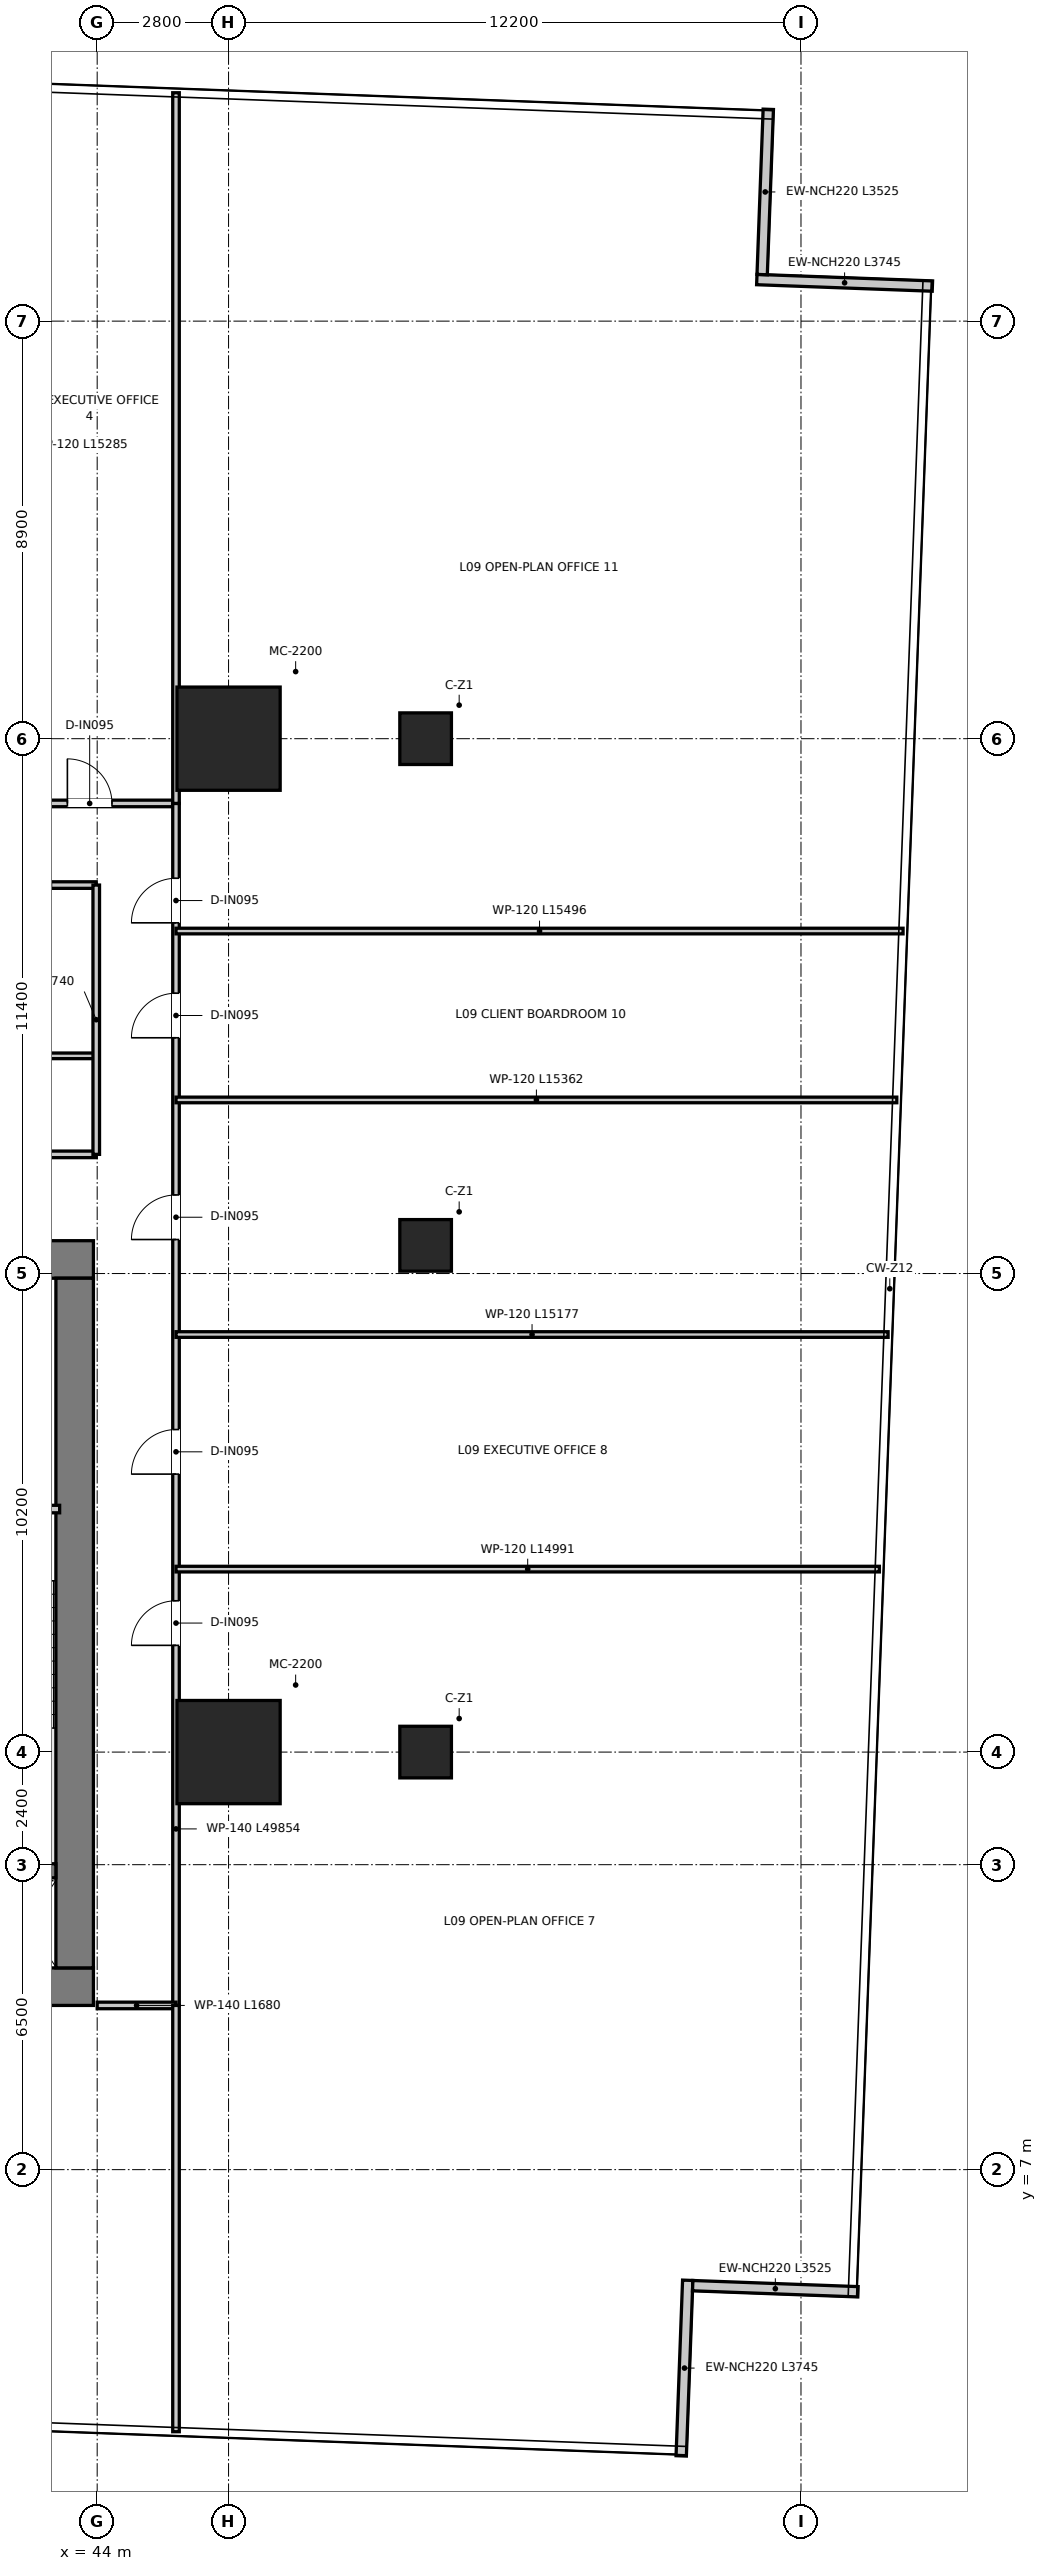
"""IFC4 building model, lengths in metres.
Left out: names, types, materials, properties, quantities, classifications, styles, units other than length and angle.
Written with IfcOpenShell. Run it as: python <this file> out.ifc"""

import sys

from ifc_helpers import new_model, si_unit, direction, frame, frame_2d, origin, origin_2d, place, context, subcontext, project, spatial, rectangle, extrude, source, transform, mapped, element, fill, save


model = new_model("IFC4")
c1 = context("Model", 3, precision=1e-05, world=origin(), true_north=direction((0.0, 1.0)))
c2 = subcontext(c1, "Body", "Model", "MODEL_VIEW")
j1 = project(units=[si_unit("LENGTHUNIT", "METRE"), si_unit("PLANEANGLEUNIT", "RADIAN")], contexts=[c1])
p1 = place(None, origin())
s1 = spatial("IfcSite", under=j1, at=p1, CompositionType="ELEMENT")
p2 = place(p1, origin())
s2 = spatial("IfcBuilding", under=s1, at=p2, CompositionType="ELEMENT")
p3 = place(p2, frame((0.0, 0.0, 40.8)))
s3 = spatial("IfcBuildingStorey", under=s2, at=p3, CompositionType="ELEMENT", Elevation=40.8)
p4 = place(p3, frame((28.08, 10.9, 0.0), z_axis=(0.0, 0.0, 1.0), x_axis=(1.0, 0.0, 0.0)))
e1 = element("IfcWall", 1, at=p4, inside=s3, PredefinedType="SHEAR", context=c2, shape_type="SweptSolid", body=[
    extrude(rectangle(XDim=15.84, YDim=0.8, at=frame_2d((7.92, 0.0))), origin(), (0.0, 0.0, 1.0), 3.95),
])
p5 = place(p3, frame((28.08, 26.4, 0.0), z_axis=(0.0, 0.0, 1.0), x_axis=(1.0, 0.0, 0.0)))
e2 = element("IfcWall", 2, at=p5, inside=s3, PredefinedType="SHEAR", context=c2, shape_type="SweptSolid", body=[
    extrude(rectangle(XDim=15.84, YDim=0.8, at=frame_2d((7.92, 0.0))), origin(), (0.0, 0.0, 1.0), 3.95),
])
p6 = place(p5, frame((7.22, 0.0, 0.0)))
e3 = element("IfcOpeningElement", 3, at=p6, cuts=e2, PredefinedType="OPENING", context=c2, shape_type="SweptSolid", body=[
    extrude(rectangle(XDim=1.4, YDim=2.2, at=frame_2d((0.7, 1.1))), frame((0.0, 0.41, 0.0), z_axis=(0.0, -1.0, 0.0), x_axis=(1.0, 0.0, 0.0)), (0.0, 0.0, 1.0), 0.82),
])
p7 = place(p5, frame((1.775, 0.0, 0.0)))
e4 = element("IfcOpeningElement", 4, at=p7, cuts=e2, PredefinedType="OPENING", context=c2, shape_type="SweptSolid", body=[
    extrude(rectangle(XDim=1.05, YDim=2.1, at=frame_2d((0.525, 1.05))), frame((0.0, 0.41, 0.0), z_axis=(0.0, -1.0, 0.0), x_axis=(1.0, 0.0, 0.0)), (0.0, 0.0, 1.0), 0.82),
])
p8 = place(p5, frame((13.015, 0.0, 0.0)))
e5 = element("IfcOpeningElement", 5, at=p8, cuts=e2, PredefinedType="OPENING", context=c2, shape_type="SweptSolid", body=[
    extrude(rectangle(XDim=1.05, YDim=2.1, at=frame_2d((0.525, 1.05))), frame((0.0, 0.41, 0.0), z_axis=(0.0, -1.0, 0.0), x_axis=(1.0, 0.0, 0.0)), (0.0, 0.0, 1.0), 0.82),
])
p9 = place(p3, frame((43.52, 11.3, 0.0), z_axis=(0.0, 0.0, 1.0), x_axis=(0.0, 1.0, 0.0)))
e6 = element("IfcWall", 6, at=p9, inside=s3, PredefinedType="SHEAR", context=c2, shape_type="SweptSolid", body=[
    extrude(rectangle(XDim=14.7, YDim=0.8, at=frame_2d((7.35, 0.0))), origin(), (0.0, 0.0, 1.0), 3.95),
])
p10 = place(p3, frame((40.02, 13.37, 0.0), z_axis=(0.0, 0.0, 1.0), x_axis=(1.0, 0.0, 0.0)))
e7 = element("IfcWall", 7, at=p10, inside=s3, PredefinedType="SHEAR", context=c2, shape_type="SweptSolid", body=[
    extrude(rectangle(XDim=3.1, YDim=0.3, at=frame_2d((1.55, 0.0))), origin(), (0.0, 0.0, 1.0), 3.95),
])
m1 = source(origin(), c2, "Body", "SweptSolid", [
    extrude(rectangle(XDim=2.2, YDim=2.2, at=origin_2d()), origin(), (0.0, 0.0, 1.0), 3.95),
])
for number, where, z_axis, x_axis in (
    (8, (46.8, 15.9, 0.0), (0.0, 0.0, 1.0), (1.0, 0.0, 0.0)),
    (9, (46.8, 37.5, 0.0), (0.0, 0.0, 1.0), (1.0, 0.0, 0.0)),
):
    element("IfcColumn", number, at=place(p3, frame(where, z_axis=z_axis, x_axis=x_axis)), inside=s3, PredefinedType="USERDEFINED", context=c2, shape_type="MappedRepresentation", body=[
        mapped(m1, transform((0.0, 0.0, 0.0), x_axis=(1.0, 0.0, 0.0), y_axis=(0.0, 1.0, 0.0), z_axis=(0.0, 0.0, 1.0), scale=1.0)),
    ])
m2 = source(origin(), c2, "Body", "SweptSolid", [
    extrude(rectangle(XDim=1.1, YDim=1.1, at=origin_2d()), origin(), (0.0, 0.0, 1.0), 3.95),
])
for number, where, z_axis, x_axis in (
    (10, (51.0, 37.5, 0.0), (0.0, 0.0, 1.0), (1.0, 0.0, 0.0)),
    (11, (51.0, 26.7, 0.0), (0.0, 0.0, 1.0), (1.0, 0.0, 0.0)),
    (12, (51.0, 15.9, 0.0), (0.0, 0.0, 1.0), (1.0, 0.0, 0.0)),
):
    element("IfcColumn", number, at=place(p3, frame(where, z_axis=z_axis, x_axis=x_axis)), inside=s3, PredefinedType="COLUMN", context=c2, shape_type="MappedRepresentation", body=[
        mapped(m2, transform((0.0, 0.0, 0.0), x_axis=(1.0, 0.0, 0.0), y_axis=(0.0, 1.0, 0.0), z_axis=(0.0, 0.0, 1.0), scale=1.0)),
    ])
p11 = place(p3, frame((56.447, 0.899, 0.0), z_axis=(0.0, 0.0, 1.0), x_axis=(0.037093640215, 0.999311794114, 0.0)))
e13 = element("IfcWall", 13, at=p11, inside=s3, PredefinedType="ELEMENTEDWALL", context=c2, shape_type="SweptSolid", body=[
    extrude(rectangle(XDim=3.745, YDim=0.22, at=frame_2d((1.873, 0.0))), origin(), (0.0, 0.0, 1.0), 3.67),
])
p12 = place(p3, frame((56.692, 4.528, 0.0), z_axis=(0.0, 0.0, 1.0), x_axis=(0.99931065272, -0.037124376896, 0.0)))
e14 = element("IfcWall", 14, at=p12, inside=s3, PredefinedType="ELEMENTEDWALL", context=c2, shape_type="SweptSolid", body=[
    extrude(rectangle(XDim=3.525, YDim=0.22, at=frame_2d((1.762, 0.0))), origin(), (0.0, 0.0, 1.0), 3.67),
])
p13 = place(p3, frame((61.801, 47.147, 0.0), z_axis=(0.0, 0.0, 1.0), x_axis=(-0.999314208504, 0.037028538746, 0.0)))
e15 = element("IfcWall", 15, at=p13, inside=s3, PredefinedType="ELEMENTEDWALL", context=c2, shape_type="SweptSolid", body=[
    extrude(rectangle(XDim=3.745, YDim=0.22, at=frame_2d((1.873, 0.0))), origin(), (0.0, 0.0, 1.0), 3.67),
])
p14 = place(p3, frame((58.173, 47.392, 0.0), z_axis=(0.0, 0.0, 1.0), x_axis=(0.03705521019, 0.999313219865, 0.0)))
e16 = element("IfcWall", 16, at=p14, inside=s3, PredefinedType="ELEMENTEDWALL", context=c2, shape_type="SweptSolid", body=[
    extrude(rectangle(XDim=3.525, YDim=0.22, at=frame_2d((1.762, 0.0))), origin(), (0.0, 0.0, 1.0), 3.67),
])
p15 = place(p3, frame((40.04, 21.08, 0.0), z_axis=(0.0, 0.0, 1.0), x_axis=(1.0, 0.0, 0.0)))
e17 = element("IfcWall", 17, at=p15, inside=s3, PredefinedType="PARTITIONING", context=c2, shape_type="SweptSolid", body=[
    extrude(rectangle(XDim=3.16, YDim=0.16, at=frame_2d((1.58, 0.0))), origin(), (0.0, 0.0, 1.0), 3.67),
])
p16 = place(p15, frame((1.055, 0.0, 0.0)))
e18 = element("IfcOpeningElement", 18, at=p16, cuts=e17, PredefinedType="OPENING", context=c2, shape_type="SweptSolid", body=[
    extrude(rectangle(XDim=1.05, YDim=2.1, at=frame_2d((0.525, 1.05))), frame((0.0, 0.09, 0.0), z_axis=(0.0, -1.0, 0.0), x_axis=(1.0, 0.0, 0.0)), (0.0, 0.0, 1.0), 0.18),
])
p17 = place(p3, frame((28.02, 28.64, 0.0), z_axis=(0.0, 0.0, 1.0), x_axis=(1.0, 0.0, 0.0)))
e19 = element("IfcWall", 19, at=p17, inside=s3, PredefinedType="PARTITIONING", context=c2, shape_type="SweptSolid", body=[
    extrude(rectangle(XDim=15.96, YDim=0.14, at=frame_2d((7.98, 0.0))), origin(), (0.0, 0.0, 1.0), 3.08),
])
p18 = place(p17, frame((7.455, 0.0, 0.0)))
e20 = element("IfcOpeningElement", 20, at=p18, cuts=e19, PredefinedType="OPENING", context=c2, shape_type="SweptSolid", body=[
    extrude(rectangle(XDim=1.05, YDim=2.15, at=frame_2d((0.525, 1.075))), frame((0.0, 0.08, 0.0), z_axis=(0.0, -1.0, 0.0), x_axis=(1.0, 0.0, 0.0)), (0.0, 0.0, 1.0), 0.16),
])
p19 = place(p3, frame((28.02, 30.74, 0.0), z_axis=(0.0, 0.0, 1.0), x_axis=(1.0, 0.0, 0.0)))
e21 = element("IfcWall", 21, at=p19, inside=s3, PredefinedType="PARTITIONING", context=c2, shape_type="SweptSolid", body=[
    extrude(rectangle(XDim=15.96, YDim=0.12, at=frame_2d((7.98, 0.0))), origin(), (0.0, 0.0, 1.0), 3.08),
])
p20 = place(p3, frame((28.02, 34.38, 0.0), z_axis=(0.0, 0.0, 1.0), x_axis=(1.0, 0.0, 0.0)))
e22 = element("IfcWall", 22, at=p20, inside=s3, PredefinedType="PARTITIONING", context=c2, shape_type="SweptSolid", body=[
    extrude(rectangle(XDim=15.96, YDim=0.14, at=frame_2d((7.98, 0.0))), origin(), (0.0, 0.0, 1.0), 3.08),
])
p21 = place(p20, frame((7.83, 0.0, 0.0)))
e23 = element("IfcOpeningElement", 23, at=p21, cuts=e22, PredefinedType="OPENING", context=c2, shape_type="SweptSolid", body=[
    extrude(rectangle(XDim=0.9, YDim=2.1, at=frame_2d((0.45, 1.05))), frame((0.0, 0.08, 0.0), z_axis=(0.0, -1.0, 0.0), x_axis=(1.0, 0.0, 0.0)), (0.0, 0.0, 1.0), 0.16),
])
p22 = place(p20, frame((11.03, 0.0, 0.0)))
e24 = element("IfcOpeningElement", 24, at=p22, cuts=e22, PredefinedType="OPENING", context=c2, shape_type="SweptSolid", body=[
    extrude(rectangle(XDim=0.9, YDim=2.1, at=frame_2d((0.45, 1.05))), frame((0.0, 0.08, 0.0), z_axis=(0.0, -1.0, 0.0), x_axis=(1.0, 0.0, 0.0)), (0.0, 0.0, 1.0), 0.16),
])
p23 = place(p20, frame((14.055, 0.0, 0.0)))
e25 = element("IfcOpeningElement", 25, at=p23, cuts=e22, PredefinedType="OPENING", context=c2, shape_type="SweptSolid", body=[
    extrude(rectangle(XDim=0.95, YDim=2.1, at=frame_2d((0.475, 1.05))), frame((0.0, 0.08, 0.0), z_axis=(0.0, -1.0, 0.0), x_axis=(1.0, 0.0, 0.0)), (0.0, 0.0, 1.0), 0.16),
])
p24 = place(p20, frame((2.855, 0.0, 0.0)))
e26 = element("IfcOpeningElement", 26, at=p24, cuts=e22, PredefinedType="OPENING", context=c2, shape_type="SweptSolid", body=[
    extrude(rectangle(XDim=0.95, YDim=2.1, at=frame_2d((0.475, 1.05))), frame((0.0, 0.08, 0.0), z_axis=(0.0, -1.0, 0.0), x_axis=(1.0, 0.0, 0.0)), (0.0, 0.0, 1.0), 0.16),
])
p25 = place(p3, frame((43.98, 28.64, 0.0), z_axis=(0.0, 0.0, 1.0), x_axis=(0.0, 1.0, 0.0)))
e27 = element("IfcWall", 27, at=p25, inside=s3, PredefinedType="PARTITIONING", context=c2, shape_type="SweptSolid", body=[
    extrude(rectangle(XDim=5.74, YDim=0.14, at=frame_2d((2.87, 0.0))), origin(), (0.0, 0.0, 1.0), 3.22),
])
p26 = place(p3, frame((26.32, 36.12, 0.0), z_axis=(0.0, 0.0, 1.0), x_axis=(1.0, 0.0, 0.0)))
e28 = element("IfcWall", 28, at=p26, inside=s3, PredefinedType="PARTITIONING", context=c2, shape_type="SweptSolid", body=[
    extrude(rectangle(XDim=19.36, YDim=0.14, at=frame_2d((9.68, 0.0))), origin(), (0.0, 0.0, 1.0), 3.08),
])
p27 = place(p26, frame((1.365, 0.0, 0.0)))
e29 = element("IfcOpeningElement", 29, at=p27, cuts=e28, PredefinedType="OPENING", context=c2, shape_type="SweptSolid", body=[
    extrude(rectangle(XDim=0.95, YDim=2.1, at=frame_2d((0.475, 1.05))), frame((0.0, 0.08, 0.0), z_axis=(0.0, -1.0, 0.0), x_axis=(1.0, 0.0, 0.0)), (0.0, 0.0, 1.0), 0.16),
])
p28 = place(p26, frame((6.205, 0.0, 0.0)))
e30 = element("IfcOpeningElement", 30, at=p28, cuts=e28, PredefinedType="OPENING", context=c2, shape_type="SweptSolid", body=[
    extrude(rectangle(XDim=0.95, YDim=2.1, at=frame_2d((0.475, 1.05))), frame((0.0, 0.08, 0.0), z_axis=(0.0, -1.0, 0.0), x_axis=(1.0, 0.0, 0.0)), (0.0, 0.0, 1.0), 0.16),
])
p29 = place(p26, frame((12.205, 0.0, 0.0)))
e31 = element("IfcOpeningElement", 31, at=p29, cuts=e28, PredefinedType="OPENING", context=c2, shape_type="SweptSolid", body=[
    extrude(rectangle(XDim=0.95, YDim=2.1, at=frame_2d((0.475, 1.05))), frame((0.0, 0.08, 0.0), z_axis=(0.0, -1.0, 0.0), x_axis=(1.0, 0.0, 0.0)), (0.0, 0.0, 1.0), 0.16),
])
p30 = place(p26, frame((17.045, 0.0, 0.0)))
e32 = element("IfcOpeningElement", 32, at=p30, cuts=e28, PredefinedType="OPENING", context=c2, shape_type="SweptSolid", body=[
    extrude(rectangle(XDim=0.95, YDim=2.1, at=frame_2d((0.475, 1.05))), frame((0.0, 0.08, 0.0), z_axis=(0.0, -1.0, 0.0), x_axis=(1.0, 0.0, 0.0)), (0.0, 0.0, 1.0), 0.16),
])
p31 = place(p3, frame((45.68, 10.5, 0.0), z_axis=(0.0, 0.0, 1.0), x_axis=(0.0, 1.0, 0.0)))
e33 = element("IfcWall", 33, at=p31, inside=s3, PredefinedType="PARTITIONING", context=c2, shape_type="SweptSolid", body=[
    extrude(rectangle(XDim=25.62, YDim=0.14, at=frame_2d((12.81, 0.0))), origin(), (0.0, 0.0, 1.0), 2.97),
])
p32 = place(p31, frame((7.675, 0.0, 0.0)))
e34 = element("IfcOpeningElement", 34, at=p32, cuts=e33, PredefinedType="OPENING", context=c2, shape_type="SweptSolid", body=[
    extrude(rectangle(XDim=0.95, YDim=2.1, at=frame_2d((0.475, 1.05))), frame((0.0, 0.08, 0.0), z_axis=(0.0, -1.0, 0.0), x_axis=(1.0, 0.0, 0.0)), (0.0, 0.0, 1.0), 0.16),
])
p33 = place(p31, frame((11.325, 0.0, 0.0)))
e35 = element("IfcOpeningElement", 35, at=p33, cuts=e33, PredefinedType="OPENING", context=c2, shape_type="SweptSolid", body=[
    extrude(rectangle(XDim=0.95, YDim=2.1, at=frame_2d((0.475, 1.05))), frame((0.0, 0.08, 0.0), z_axis=(0.0, -1.0, 0.0), x_axis=(1.0, 0.0, 0.0)), (0.0, 0.0, 1.0), 0.16),
])
p34 = place(p31, frame((16.325, 0.0, 0.0)))
e36 = element("IfcOpeningElement", 36, at=p34, cuts=e33, PredefinedType="OPENING", context=c2, shape_type="SweptSolid", body=[
    extrude(rectangle(XDim=0.95, YDim=2.1, at=frame_2d((0.475, 1.05))), frame((0.0, 0.08, 0.0), z_axis=(0.0, -1.0, 0.0), x_axis=(1.0, 0.0, 0.0)), (0.0, 0.0, 1.0), 0.16),
])
p35 = place(p31, frame((20.625, 0.0, 0.0)))
e37 = element("IfcOpeningElement", 37, at=p35, cuts=e33, PredefinedType="OPENING", context=c2, shape_type="SweptSolid", body=[
    extrude(rectangle(XDim=0.95, YDim=2.1, at=frame_2d((0.475, 1.05))), frame((0.0, 0.08, 0.0), z_axis=(0.0, -1.0, 0.0), x_axis=(1.0, 0.0, 0.0)), (0.0, 0.0, 1.0), 0.16),
])
p36 = place(p31, frame((23.075, 0.0, 0.0)))
e38 = element("IfcOpeningElement", 38, at=p36, cuts=e33, PredefinedType="OPENING", context=c2, shape_type="SweptSolid", body=[
    extrude(rectangle(XDim=0.95, YDim=2.1, at=frame_2d((0.475, 1.05))), frame((0.0, 0.08, 0.0), z_axis=(0.0, -1.0, 0.0), x_axis=(1.0, 0.0, 0.0)), (0.0, 0.0, 1.0), 0.16),
])
p37 = place(p3, frame((44.0, 10.5, 0.0), z_axis=(0.0, 0.0, 1.0), x_axis=(1.0, 0.0, 0.0)))
e39 = element("IfcWall", 39, at=p37, inside=s3, PredefinedType="PARTITIONING", context=c2, shape_type="SweptSolid", body=[
    extrude(rectangle(XDim=1.68, YDim=0.14, at=frame_2d((0.84, 0.0))), origin(), (0.0, 0.0, 1.0), 3.67),
])
p38 = place(p3, frame((45.68, 36.12, 0.0), z_axis=(0.0, 0.0, 1.0), x_axis=(0.0, 1.0, 0.0)))
e40 = element("IfcWall", 40, at=p38, inside=s3, PredefinedType="PARTITIONING", context=c2, shape_type="SweptSolid", body=[
    extrude(rectangle(XDim=15.148, YDim=0.14, at=frame_2d((7.574, 0.0))), origin(), (0.0, 0.0, 1.0), 2.97),
])
p39 = place(p3, frame((45.68, 1.414, 0.0), z_axis=(0.0, 0.0, 1.0), x_axis=(0.0, 1.0, 0.0)))
e41 = element("IfcWall", 41, at=p39, inside=s3, PredefinedType="PARTITIONING", context=c2, shape_type="SweptSolid", body=[
    extrude(rectangle(XDim=9.086, YDim=0.14, at=frame_2d((4.543, 0.0))), origin(), (0.0, 0.0, 1.0), 3.67),
])
p40 = place(p3, frame((45.68, 19.8, 0.0), z_axis=(0.0, 0.0, 1.0), x_axis=(1.0, 0.0, 0.0)))
e42 = element("IfcWall", 42, at=p40, inside=s3, PredefinedType="PARTITIONING", context=c2, shape_type="SweptSolid", body=[
    extrude(rectangle(XDim=14.991, YDim=0.12, at=frame_2d((7.496, 0.0))), origin(), (0.0, 0.0, 1.0), 2.97),
])
p41 = place(p3, frame((45.68, 24.8, 0.0), z_axis=(0.0, 0.0, 1.0), x_axis=(1.0, 0.0, 0.0)))
e43 = element("IfcWall", 43, at=p41, inside=s3, PredefinedType="PARTITIONING", context=c2, shape_type="SweptSolid", body=[
    extrude(rectangle(XDim=15.177, YDim=0.12, at=frame_2d((7.588, 0.0))), origin(), (0.0, 0.0, 1.0), 2.97),
])
p42 = place(p3, frame((45.68, 29.8, 0.0), z_axis=(0.0, 0.0, 1.0), x_axis=(1.0, 0.0, 0.0)))
e44 = element("IfcWall", 44, at=p42, inside=s3, PredefinedType="PARTITIONING", context=c2, shape_type="SweptSolid", body=[
    extrude(rectangle(XDim=15.362, YDim=0.12, at=frame_2d((7.681, 0.0))), origin(), (0.0, 0.0, 1.0), 2.97),
])
p43 = place(p3, frame((45.68, 33.4, 0.0), z_axis=(0.0, 0.0, 1.0), x_axis=(1.0, 0.0, 0.0)))
e45 = element("IfcWall", 45, at=p43, inside=s3, PredefinedType="PARTITIONING", context=c2, shape_type="SweptSolid", body=[
    extrude(rectangle(XDim=15.496, YDim=0.12, at=frame_2d((7.748, 0.0))), origin(), (0.0, 0.0, 1.0), 2.97),
])
p44 = place(p30, origin())
e46 = element("IfcDoor", 46, at=p44, inside=s3, OperationType="SINGLE_SWING_LEFT", PredefinedType="DOOR", context=c2, shape_type="SweptSolid", body=[
    extrude(rectangle(XDim=0.95, YDim=2.1, at=frame_2d((0.475, 1.05))), frame((0.0, 0.025, 0.0), z_axis=(0.0, -1.0, 0.0), x_axis=(1.0, 0.0, 0.0)), (0.0, 0.0, 1.0), 0.05),
])
fill(e32, e46)
p45 = place(p32, origin())
e47 = element("IfcDoor", 47, at=p45, inside=s3, OperationType="SINGLE_SWING_LEFT", PredefinedType="DOOR", context=c2, shape_type="SweptSolid", body=[
    extrude(rectangle(XDim=0.95, YDim=2.1, at=frame_2d((0.475, 1.05))), frame((0.0, 0.025, 0.0), z_axis=(0.0, -1.0, 0.0), x_axis=(1.0, 0.0, 0.0)), (0.0, 0.0, 1.0), 0.05),
])
fill(e34, e47)
p46 = place(p33, origin())
e48 = element("IfcDoor", 48, at=p46, inside=s3, OperationType="SINGLE_SWING_LEFT", PredefinedType="DOOR", context=c2, shape_type="SweptSolid", body=[
    extrude(rectangle(XDim=0.95, YDim=2.1, at=frame_2d((0.475, 1.05))), frame((0.0, 0.025, 0.0), z_axis=(0.0, -1.0, 0.0), x_axis=(1.0, 0.0, 0.0)), (0.0, 0.0, 1.0), 0.05),
])
fill(e35, e48)
p47 = place(p34, origin())
e49 = element("IfcDoor", 49, at=p47, inside=s3, OperationType="SINGLE_SWING_LEFT", PredefinedType="DOOR", context=c2, shape_type="SweptSolid", body=[
    extrude(rectangle(XDim=0.95, YDim=2.1, at=frame_2d((0.475, 1.05))), frame((0.0, 0.025, 0.0), z_axis=(0.0, -1.0, 0.0), x_axis=(1.0, 0.0, 0.0)), (0.0, 0.0, 1.0), 0.05),
])
fill(e36, e49)
p48 = place(p35, origin())
e50 = element("IfcDoor", 50, at=p48, inside=s3, OperationType="SINGLE_SWING_LEFT", PredefinedType="DOOR", context=c2, shape_type="SweptSolid", body=[
    extrude(rectangle(XDim=0.95, YDim=2.1, at=frame_2d((0.475, 1.05))), frame((0.0, 0.025, 0.0), z_axis=(0.0, -1.0, 0.0), x_axis=(1.0, 0.0, 0.0)), (0.0, 0.0, 1.0), 0.05),
])
fill(e37, e50)
p49 = place(p36, origin())
e51 = element("IfcDoor", 51, at=p49, inside=s3, OperationType="SINGLE_SWING_LEFT", PredefinedType="DOOR", context=c2, shape_type="SweptSolid", body=[
    extrude(rectangle(XDim=0.95, YDim=2.1, at=frame_2d((0.475, 1.05))), frame((0.0, 0.025, 0.0), z_axis=(0.0, -1.0, 0.0), x_axis=(1.0, 0.0, 0.0)), (0.0, 0.0, 1.0), 0.05),
])
fill(e38, e51)
save(model, sys.argv[1])
